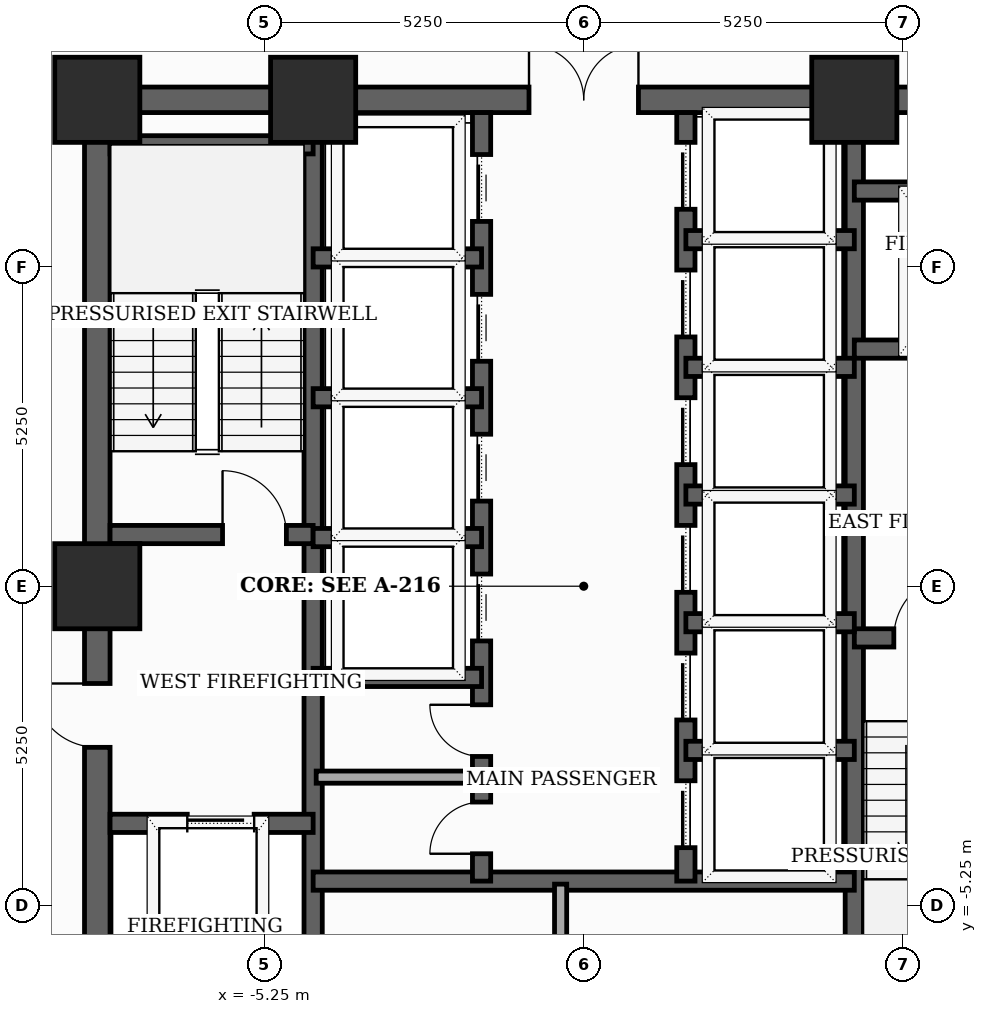
"""IFC4 building model, lengths in metres.
Left out: names, types, materials, properties, quantities, classifications, styles, units other than length and angle.
Written with IfcOpenShell. Run it as: python <this file> out.ifc"""

import sys

from ifc_helpers import new_model, si_unit, direction, frame, frame_2d, origin, origin_2d, place, context, subcontext, project, spatial, rectangle, extrude, element, fill, save


model = new_model("IFC4")
c1 = context("Model", 3, precision=1e-05, world=origin(), true_north=direction((0.0, 1.0)))
c2 = subcontext(c1, "Body", "Model", "MODEL_VIEW")
j1 = project(units=[si_unit("LENGTHUNIT", "METRE"), si_unit("PLANEANGLEUNIT", "RADIAN")], contexts=[c1])
p1 = place(None, origin())
s1 = spatial("IfcSite", under=j1, at=p1, CompositionType="ELEMENT")
p2 = place(p1, origin())
s2 = spatial("IfcBuilding", under=s1, at=p2, CompositionType="ELEMENT")
p3 = place(p2, frame((0.0, 0.0, 101.4)))
s3 = spatial("IfcBuildingStorey", under=s2, at=p3, CompositionType="ELEMENT", Elevation=101.4)
for number, where, z_axis, x_axis in (
    (1, (4.45, 8.0, 0.0), (0.0, 0.0, 1.0), (1.0, 0.0, 0.0)),
    (2, (-4.45, 8.0, 0.0), (0.0, 0.0, 1.0), (1.0, 0.0, 0.0)),
    (3, (-8.0, 8.0, 0.0), (0.0, 0.0, 1.0), (1.0, 0.0, 0.0)),
    (4, (-8.0, 0.0, 0.0), (0.0, 0.0, 1.0), (1.0, 0.0, 0.0)),
):
    element("IfcColumn", number, at=place(p3, frame(where, z_axis=z_axis, x_axis=x_axis)), inside=s3, PredefinedType="COLUMN", context=c2, shape_type="SweptSolid", body=[
        extrude(rectangle(XDim=1.4, YDim=1.4, at=origin_2d()), origin(), (0.0, 0.0, 1.0), 3.7),
    ])
p4 = place(p3, frame((-8.0, -8.0, 0.0), z_axis=(0.0, 0.0, 1.0), x_axis=(0.0, 1.0, 0.0)))
e5 = element("IfcWall", 5, at=p4, inside=s3, PredefinedType="SHEAR", context=c2, shape_type="SweptSolid", body=[
    extrude(rectangle(XDim=16.0, YDim=0.42, at=frame_2d((8.0, 0.0))), origin(), (0.0, 0.0, 1.0), 3.5),
])
p5 = place(p4, frame((0.922, 0.0, 0.0)))
e6 = element("IfcOpeningElement", 6, at=p5, cuts=e5, PredefinedType="OPENING", context=c2, shape_type="SweptSolid", body=[
    extrude(rectangle(XDim=0.85, YDim=2.02, at=frame_2d((0.425, 1.01))), frame((0.0, 0.22, 0.0), z_axis=(0.0, -1.0, 0.0), x_axis=(1.0, 0.0, 0.0)), (0.0, 0.0, 1.0), 0.44),
])
p6 = place(p4, frame((5.35, 0.0, 0.0)))
e7 = element("IfcOpeningElement", 7, at=p6, cuts=e5, PredefinedType="OPENING", context=c2, shape_type="SweptSolid", body=[
    extrude(rectangle(XDim=1.05, YDim=2.15, at=frame_2d((0.525, 1.075))), frame((0.0, 0.22, 0.0), z_axis=(0.0, -1.0, 0.0), x_axis=(1.0, 0.0, 0.0)), (0.0, 0.0, 1.0), 0.44),
])
p7 = place(p3, frame((-8.0, 8.0, 0.0), z_axis=(0.0, 0.0, 1.0), x_axis=(1.0, 0.0, 0.0)))
e8 = element("IfcWall", 8, at=p7, inside=s3, PredefinedType="SHEAR", context=c2, shape_type="SweptSolid", body=[
    extrude(rectangle(XDim=16.0, YDim=0.42, at=frame_2d((8.0, 0.0))), origin(), (0.0, 0.0, 1.0), 3.5),
])
p8 = place(p7, frame((7.1, 0.0, 0.0)))
e9 = element("IfcOpeningElement", 9, at=p8, cuts=e8, PredefinedType="OPENING", context=c2, shape_type="SweptSolid", body=[
    extrude(rectangle(XDim=1.8, YDim=2.15, at=frame_2d((0.9, 1.075))), frame((0.0, 0.22, 0.0), z_axis=(0.0, -1.0, 0.0), x_axis=(1.0, 0.0, 0.0)), (0.0, 0.0, 1.0), 0.44),
])
for number, where, z_axis, x_axis in (
    (10, (-4.45, -7.79, 0.0), (0.0, 0.0, 1.0), (0.0, 1.0, 0.0)),
    (11, (4.45, -7.79, 0.0), (0.0, 0.0, 1.0), (0.0, 1.0, 0.0)),
):
    element("IfcWall", number, at=place(p3, frame(where, z_axis=z_axis, x_axis=x_axis)), inside=s3, PredefinedType="SHEAR", context=c2, shape_type="SweptSolid", body=[
        extrude(rectangle(XDim=15.58, YDim=0.3, at=frame_2d((7.79, 0.0))), origin(), (0.0, 0.0, 1.0), 3.5),
    ])
p9 = place(p3, frame((-7.79, 0.85, 0.0), z_axis=(0.0, 0.0, 1.0), x_axis=(1.0, 0.0, 0.0)))
e12 = element("IfcWall", 12, at=p9, inside=s3, PredefinedType="SHEAR", context=c2, shape_type="SweptSolid", body=[
    extrude(rectangle(XDim=3.34, YDim=0.3, at=frame_2d((1.67, 0.0))), origin(), (0.0, 0.0, 1.0), 3.5),
])
p10 = place(p9, frame((1.85, 0.0, 0.0)))
e13 = element("IfcOpeningElement", 13, at=p10, cuts=e12, PredefinedType="OPENING", context=c2, shape_type="SweptSolid", body=[
    extrude(rectangle(XDim=1.05, YDim=2.15, at=frame_2d((0.525, 1.075))), frame((0.0, 0.16, 0.0), z_axis=(0.0, -1.0, 0.0), x_axis=(1.0, 0.0, 0.0)), (0.0, 0.0, 1.0), 0.32),
])
p11 = place(p3, frame((-7.79, 7.26, 0.0), z_axis=(0.0, 0.0, 1.0), x_axis=(1.0, 0.0, 0.0)))
e14 = element("IfcWall", 14, at=p11, inside=s3, PredefinedType="SHEAR", context=c2, shape_type="SweptSolid", body=[
    extrude(rectangle(XDim=3.34, YDim=0.3, at=frame_2d((1.67, 0.0))), origin(), (0.0, 0.0, 1.0), 3.5),
])
p12 = place(p3, frame((4.45, -0.85, 0.0), z_axis=(0.0, 0.0, 1.0), x_axis=(1.0, 0.0, 0.0)))
e15 = element("IfcWall", 15, at=p12, inside=s3, PredefinedType="SHEAR", context=c2, shape_type="SweptSolid", body=[
    extrude(rectangle(XDim=3.34, YDim=0.3, at=frame_2d((1.67, 0.0))), origin(), (0.0, 0.0, 1.0), 3.5),
])
p13 = place(p12, frame((0.65, 0.0, 0.0)))
e16 = element("IfcOpeningElement", 16, at=p13, cuts=e15, PredefinedType="OPENING", context=c2, shape_type="SweptSolid", body=[
    extrude(rectangle(XDim=1.05, YDim=2.15, at=frame_2d((0.525, 1.075))), frame((0.0, 0.16, 0.0), z_axis=(0.0, -1.0, 0.0), x_axis=(1.0, 0.0, 0.0)), (0.0, 0.0, 1.0), 0.32),
])
p14 = place(p3, frame((-7.79, -3.9, 0.0), z_axis=(0.0, 0.0, 1.0), x_axis=(1.0, 0.0, 0.0)))
e17 = element("IfcWall", 17, at=p14, inside=s3, PredefinedType="SHEAR", context=c2, shape_type="SweptSolid", body=[
    extrude(rectangle(XDim=3.34, YDim=0.3, at=frame_2d((1.67, 0.0))), origin(), (0.0, 0.0, 1.0), 3.5),
])
p15 = place(p14, frame((1.27, 0.0, 0.0)))
e18 = element("IfcOpeningElement", 18, at=p15, cuts=e17, PredefinedType="OPENING", context=c2, shape_type="SweptSolid", body=[
    extrude(rectangle(XDim=1.1, YDim=2.1, at=frame_2d((0.55, 1.05))), frame((0.0, 0.16, 0.0), z_axis=(0.0, -1.0, 0.0), x_axis=(1.0, 0.0, 0.0)), (0.0, 0.0, 1.0), 0.32),
])
p16 = place(p3, frame((4.45, 3.9, 0.0), z_axis=(0.0, 0.0, 1.0), x_axis=(1.0, 0.0, 0.0)))
e19 = element("IfcWall", 19, at=p16, inside=s3, PredefinedType="SHEAR", context=c2, shape_type="SweptSolid", body=[
    extrude(rectangle(XDim=3.34, YDim=0.3, at=frame_2d((1.67, 0.0))), origin(), (0.0, 0.0, 1.0), 3.5),
])
p17 = place(p16, frame((1.18, 0.0, 0.0)))
e20 = element("IfcOpeningElement", 20, at=p17, cuts=e19, PredefinedType="OPENING", context=c2, shape_type="SweptSolid", body=[
    extrude(rectangle(XDim=1.1, YDim=2.1, at=frame_2d((0.55, 1.05))), frame((0.0, 0.16, 0.0), z_axis=(0.0, -1.0, 0.0), x_axis=(1.0, 0.0, 0.0)), (0.0, 0.0, 1.0), 0.32),
])
p18 = place(p3, frame((4.45, 6.5, 0.0), z_axis=(0.0, 0.0, 1.0), x_axis=(1.0, 0.0, 0.0)))
e21 = element("IfcWall", 21, at=p18, inside=s3, PredefinedType="SHEAR", context=c2, shape_type="SweptSolid", body=[
    extrude(rectangle(XDim=3.34, YDim=0.3, at=frame_2d((1.67, 0.0))), origin(), (0.0, 0.0, 1.0), 3.5),
])
p19 = place(p3, frame((-4.45, -4.85, 0.0), z_axis=(0.0, 0.0, 1.0), x_axis=(1.0, 0.0, 0.0)))
e22 = element("IfcWall", 22, at=p19, inside=s3, PredefinedType="SHEAR", context=c2, shape_type="SweptSolid", body=[
    extrude(rectangle(XDim=8.9, YDim=0.3, at=frame_2d((4.45, 0.0))), origin(), (0.0, 0.0, 1.0), 3.5),
])
p20 = place(p3, frame((-1.68, -4.85, 0.0), z_axis=(0.0, 0.0, 1.0), x_axis=(0.0, 1.0, 0.0)))
e23 = element("IfcWall", 23, at=p20, inside=s3, PredefinedType="SHEAR", context=c2, shape_type="SweptSolid", body=[
    extrude(rectangle(XDim=12.64, YDim=0.3, at=frame_2d((6.32, 0.0))), origin(), (0.0, 0.0, 1.0), 3.5),
])
p21 = place(p20, frame((3.95, 0.0, 0.0)))
e24 = element("IfcOpeningElement", 24, at=p21, cuts=e23, PredefinedType="OPENING", context=c2, shape_type="SweptSolid", body=[
    extrude(rectangle(XDim=1.1, YDim=2.1, at=frame_2d((0.55, 1.05))), frame((0.0, 0.16, 0.0), z_axis=(0.0, -1.0, 0.0), x_axis=(1.0, 0.0, 0.0)), (0.0, 0.0, 1.0), 0.32),
])
p22 = place(p20, frame((6.25, 0.0, 0.0)))
e25 = element("IfcOpeningElement", 25, at=p22, cuts=e23, PredefinedType="OPENING", context=c2, shape_type="SweptSolid", body=[
    extrude(rectangle(XDim=1.1, YDim=2.1, at=frame_2d((0.55, 1.05))), frame((0.0, 0.16, 0.0), z_axis=(0.0, -1.0, 0.0), x_axis=(1.0, 0.0, 0.0)), (0.0, 0.0, 1.0), 0.32),
])
p23 = place(p20, frame((8.55, 0.0, 0.0)))
e26 = element("IfcOpeningElement", 26, at=p23, cuts=e23, PredefinedType="OPENING", context=c2, shape_type="SweptSolid", body=[
    extrude(rectangle(XDim=1.1, YDim=2.1, at=frame_2d((0.55, 1.05))), frame((0.0, 0.16, 0.0), z_axis=(0.0, -1.0, 0.0), x_axis=(1.0, 0.0, 0.0)), (0.0, 0.0, 1.0), 0.32),
])
p24 = place(p20, frame((10.85, 0.0, 0.0)))
e27 = element("IfcOpeningElement", 27, at=p24, cuts=e23, PredefinedType="OPENING", context=c2, shape_type="SweptSolid", body=[
    extrude(rectangle(XDim=1.1, YDim=2.1, at=frame_2d((0.55, 1.05))), frame((0.0, 0.16, 0.0), z_axis=(0.0, -1.0, 0.0), x_axis=(1.0, 0.0, 0.0)), (0.0, 0.0, 1.0), 0.32),
])
p25 = place(p20, frame((0.45, 0.0, 0.0)))
e28 = element("IfcOpeningElement", 28, at=p25, cuts=e23, PredefinedType="OPENING", context=c2, shape_type="SweptSolid", body=[
    extrude(rectangle(XDim=0.85, YDim=2.02, at=frame_2d((0.425, 1.01))), frame((0.0, 0.16, 0.0), z_axis=(0.0, -1.0, 0.0), x_axis=(1.0, 0.0, 0.0)), (0.0, 0.0, 1.0), 0.32),
])
p26 = place(p20, frame((2.05, 0.0, 0.0)))
e29 = element("IfcOpeningElement", 29, at=p26, cuts=e23, PredefinedType="OPENING", context=c2, shape_type="SweptSolid", body=[
    extrude(rectangle(XDim=0.85, YDim=2.02, at=frame_2d((0.425, 1.01))), frame((0.0, 0.16, 0.0), z_axis=(0.0, -1.0, 0.0), x_axis=(1.0, 0.0, 0.0)), (0.0, 0.0, 1.0), 0.32),
])
p27 = place(p3, frame((1.68, -4.85, 0.0), z_axis=(0.0, 0.0, 1.0), x_axis=(0.0, 1.0, 0.0)))
e30 = element("IfcWall", 30, at=p27, inside=s3, PredefinedType="SHEAR", context=c2, shape_type="SweptSolid", body=[
    extrude(rectangle(XDim=12.64, YDim=0.3, at=frame_2d((6.32, 0.0))), origin(), (0.0, 0.0, 1.0), 3.5),
])
p28 = place(p27, frame((0.55, 0.0, 0.0)))
e31 = element("IfcOpeningElement", 31, at=p28, cuts=e30, PredefinedType="OPENING", context=c2, shape_type="SweptSolid", body=[
    extrude(rectangle(XDim=1.1, YDim=2.1, at=frame_2d((0.55, 1.05))), frame((0.0, 0.16, 0.0), z_axis=(0.0, -1.0, 0.0), x_axis=(1.0, 0.0, 0.0)), (0.0, 0.0, 1.0), 0.32),
])
p29 = place(p27, frame((2.65, 0.0, 0.0)))
e32 = element("IfcOpeningElement", 32, at=p29, cuts=e30, PredefinedType="OPENING", context=c2, shape_type="SweptSolid", body=[
    extrude(rectangle(XDim=1.1, YDim=2.1, at=frame_2d((0.55, 1.05))), frame((0.0, 0.16, 0.0), z_axis=(0.0, -1.0, 0.0), x_axis=(1.0, 0.0, 0.0)), (0.0, 0.0, 1.0), 0.32),
])
p30 = place(p27, frame((4.75, 0.0, 0.0)))
e33 = element("IfcOpeningElement", 33, at=p30, cuts=e30, PredefinedType="OPENING", context=c2, shape_type="SweptSolid", body=[
    extrude(rectangle(XDim=1.1, YDim=2.1, at=frame_2d((0.55, 1.05))), frame((0.0, 0.16, 0.0), z_axis=(0.0, -1.0, 0.0), x_axis=(1.0, 0.0, 0.0)), (0.0, 0.0, 1.0), 0.32),
])
p31 = place(p27, frame((6.85, 0.0, 0.0)))
e34 = element("IfcOpeningElement", 34, at=p31, cuts=e30, PredefinedType="OPENING", context=c2, shape_type="SweptSolid", body=[
    extrude(rectangle(XDim=1.1, YDim=2.1, at=frame_2d((0.55, 1.05))), frame((0.0, 0.16, 0.0), z_axis=(0.0, -1.0, 0.0), x_axis=(1.0, 0.0, 0.0)), (0.0, 0.0, 1.0), 0.32),
])
p32 = place(p27, frame((8.95, 0.0, 0.0)))
e35 = element("IfcOpeningElement", 35, at=p32, cuts=e30, PredefinedType="OPENING", context=c2, shape_type="SweptSolid", body=[
    extrude(rectangle(XDim=1.1, YDim=2.1, at=frame_2d((0.55, 1.05))), frame((0.0, 0.16, 0.0), z_axis=(0.0, -1.0, 0.0), x_axis=(1.0, 0.0, 0.0)), (0.0, 0.0, 1.0), 0.32),
])
p33 = place(p27, frame((11.05, 0.0, 0.0)))
e36 = element("IfcOpeningElement", 36, at=p33, cuts=e30, PredefinedType="OPENING", context=c2, shape_type="SweptSolid", body=[
    extrude(rectangle(XDim=1.1, YDim=2.1, at=frame_2d((0.55, 1.05))), frame((0.0, 0.16, 0.0), z_axis=(0.0, -1.0, 0.0), x_axis=(1.0, 0.0, 0.0)), (0.0, 0.0, 1.0), 0.32),
])
for number, where, z_axis, x_axis in (
    (37, (-4.45, -1.5, 0.0), (0.0, 0.0, 1.0), (1.0, 0.0, 0.0)),
    (38, (-4.45, 0.8, 0.0), (0.0, 0.0, 1.0), (1.0, 0.0, 0.0)),
    (39, (-4.45, 3.1, 0.0), (0.0, 0.0, 1.0), (1.0, 0.0, 0.0)),
    (40, (-4.45, 5.4, 0.0), (0.0, 0.0, 1.0), (1.0, 0.0, 0.0)),
    (41, (1.68, 1.5, 0.0), (0.0, 0.0, 1.0), (1.0, 0.0, 0.0)),
    (42, (1.68, 3.6, 0.0), (0.0, 0.0, 1.0), (1.0, 0.0, 0.0)),
    (43, (1.68, 5.7, 0.0), (0.0, 0.0, 1.0), (1.0, 0.0, 0.0)),
    (44, (1.68, -2.7, 0.0), (0.0, 0.0, 1.0), (1.0, 0.0, 0.0)),
    (45, (1.68, -0.6, 0.0), (0.0, 0.0, 1.0), (1.0, 0.0, 0.0)),
):
    element("IfcWall", number, at=place(p3, frame(where, z_axis=z_axis, x_axis=x_axis)), inside=s3, PredefinedType="SHEAR", context=c2, shape_type="SweptSolid", body=[
        extrude(rectangle(XDim=2.77, YDim=0.3, at=frame_2d((1.385, 0.0))), origin(), (0.0, 0.0, 1.0), 3.5),
    ])
p34 = place(p3, frame((-0.38, -7.85, 0.0), z_axis=(0.0, 0.0, 1.0), x_axis=(0.0, 1.0, 0.0)))
e46 = element("IfcWall", 46, at=p34, inside=s3, PredefinedType="SOLIDWALL", context=c2, shape_type="SweptSolid", body=[
    extrude(rectangle(XDim=2.95, YDim=0.2, at=frame_2d((1.475, 0.0))), origin(), (0.0, 0.0, 1.0), 2.885),
])
p35 = place(p3, frame((-4.4, -3.14, 0.0), z_axis=(0.0, 0.0, 1.0), x_axis=(1.0, 0.0, 0.0)))
e47 = element("IfcWall", 47, at=p35, inside=s3, PredefinedType="SOLIDWALL", context=c2, shape_type="SweptSolid", body=[
    extrude(rectangle(XDim=2.68, YDim=0.2, at=frame_2d((1.34, 0.0))), origin(), (0.0, 0.0, 1.0), 3.5),
])
p36 = place(p6, origin())
e48 = element("IfcDoor", 48, at=p36, inside=s3, OperationType="SINGLE_SWING_RIGHT", PredefinedType="DOOR", context=c2, shape_type="SweptSolid", body=[
    extrude(rectangle(XDim=1.05, YDim=2.15, at=frame_2d((0.525, 1.075))), frame((0.0, 0.025, 0.0), z_axis=(0.0, -1.0, 0.0), x_axis=(1.0, 0.0, 0.0)), (0.0, 0.0, 1.0), 0.05),
])
fill(e7, e48)
p37 = place(p8, origin())
e49 = element("IfcDoor", 49, at=p37, inside=s3, OperationType="DOUBLE_DOOR_SINGLE_SWING", PredefinedType="DOOR", context=c2, shape_type="SweptSolid", body=[
    extrude(rectangle(XDim=1.8, YDim=2.15, at=frame_2d((0.9, 1.075))), frame((0.0, 0.025, 0.0), z_axis=(0.0, -1.0, 0.0), x_axis=(1.0, 0.0, 0.0)), (0.0, 0.0, 1.0), 0.05),
])
fill(e9, e49)
p38 = place(p10, origin())
e50 = element("IfcDoor", 50, at=p38, inside=s3, OperationType="SINGLE_SWING_LEFT", PredefinedType="DOOR", context=c2, shape_type="SweptSolid", body=[
    extrude(rectangle(XDim=1.05, YDim=2.15, at=frame_2d((0.525, 1.075))), frame((0.0, 0.025, 0.0), z_axis=(0.0, -1.0, 0.0), x_axis=(1.0, 0.0, 0.0)), (0.0, 0.0, 1.0), 0.05),
])
fill(e13, e50)
p39 = place(p13, origin())
e51 = element("IfcDoor", 51, at=p39, inside=s3, OperationType="SINGLE_SWING_RIGHT", PredefinedType="DOOR", context=c2, shape_type="SweptSolid", body=[
    extrude(rectangle(XDim=1.05, YDim=2.15, at=frame_2d((0.525, 1.075))), frame((0.0, 0.025, 0.0), z_axis=(0.0, -1.0, 0.0), x_axis=(1.0, 0.0, 0.0)), (0.0, 0.0, 1.0), 0.05),
])
fill(e16, e51)
p40 = place(p15, origin())
e52 = element("IfcDoor", 52, at=p40, inside=s3, OperationType="SLIDING_TO_LEFT", PredefinedType="DOOR", context=c2, shape_type="SweptSolid", body=[
    extrude(rectangle(XDim=1.1, YDim=2.1, at=frame_2d((0.55, 1.05))), frame((0.0, 0.025, 0.0), z_axis=(0.0, -1.0, 0.0), x_axis=(1.0, 0.0, 0.0)), (0.0, 0.0, 1.0), 0.05),
])
fill(e18, e52)
p41 = place(p21, origin())
e53 = element("IfcDoor", 53, at=p41, inside=s3, OperationType="SLIDING_TO_LEFT", PredefinedType="DOOR", context=c2, shape_type="SweptSolid", body=[
    extrude(rectangle(XDim=1.1, YDim=2.1, at=frame_2d((0.55, 1.05))), frame((0.0, 0.025, 0.0), z_axis=(0.0, -1.0, 0.0), x_axis=(1.0, 0.0, 0.0)), (0.0, 0.0, 1.0), 0.05),
])
fill(e24, e53)
p42 = place(p22, origin())
e54 = element("IfcDoor", 54, at=p42, inside=s3, OperationType="SLIDING_TO_LEFT", PredefinedType="DOOR", context=c2, shape_type="SweptSolid", body=[
    extrude(rectangle(XDim=1.1, YDim=2.1, at=frame_2d((0.55, 1.05))), frame((0.0, 0.025, 0.0), z_axis=(0.0, -1.0, 0.0), x_axis=(1.0, 0.0, 0.0)), (0.0, 0.0, 1.0), 0.05),
])
fill(e25, e54)
p43 = place(p23, origin())
e55 = element("IfcDoor", 55, at=p43, inside=s3, OperationType="SLIDING_TO_LEFT", PredefinedType="DOOR", context=c2, shape_type="SweptSolid", body=[
    extrude(rectangle(XDim=1.1, YDim=2.1, at=frame_2d((0.55, 1.05))), frame((0.0, 0.025, 0.0), z_axis=(0.0, -1.0, 0.0), x_axis=(1.0, 0.0, 0.0)), (0.0, 0.0, 1.0), 0.05),
])
fill(e26, e55)
p44 = place(p24, origin())
e56 = element("IfcDoor", 56, at=p44, inside=s3, OperationType="SLIDING_TO_LEFT", PredefinedType="DOOR", context=c2, shape_type="SweptSolid", body=[
    extrude(rectangle(XDim=1.1, YDim=2.1, at=frame_2d((0.55, 1.05))), frame((0.0, 0.025, 0.0), z_axis=(0.0, -1.0, 0.0), x_axis=(1.0, 0.0, 0.0)), (0.0, 0.0, 1.0), 0.05),
])
fill(e27, e56)
p45 = place(p25, origin())
e57 = element("IfcDoor", 57, at=p45, inside=s3, OperationType="SINGLE_SWING_LEFT", PredefinedType="TRAPDOOR", context=c2, shape_type="SweptSolid", body=[
    extrude(rectangle(XDim=0.85, YDim=2.02, at=frame_2d((0.425, 1.01))), frame((0.0, 0.025, 0.0), z_axis=(0.0, -1.0, 0.0), x_axis=(1.0, 0.0, 0.0)), (0.0, 0.0, 1.0), 0.05),
])
fill(e28, e57)
p46 = place(p26, origin())
e58 = element("IfcDoor", 58, at=p46, inside=s3, OperationType="SINGLE_SWING_RIGHT", PredefinedType="TRAPDOOR", context=c2, shape_type="SweptSolid", body=[
    extrude(rectangle(XDim=0.85, YDim=2.02, at=frame_2d((0.425, 1.01))), frame((0.0, 0.025, 0.0), z_axis=(0.0, -1.0, 0.0), x_axis=(1.0, 0.0, 0.0)), (0.0, 0.0, 1.0), 0.05),
])
fill(e29, e58)
p47 = place(p28, origin())
e59 = element("IfcDoor", 59, at=p47, inside=s3, OperationType="SLIDING_TO_LEFT", PredefinedType="DOOR", context=c2, shape_type="SweptSolid", body=[
    extrude(rectangle(XDim=1.1, YDim=2.1, at=frame_2d((0.55, 1.05))), frame((0.0, 0.025, 0.0), z_axis=(0.0, -1.0, 0.0), x_axis=(1.0, 0.0, 0.0)), (0.0, 0.0, 1.0), 0.05),
])
fill(e31, e59)
p48 = place(p29, origin())
e60 = element("IfcDoor", 60, at=p48, inside=s3, OperationType="SLIDING_TO_LEFT", PredefinedType="DOOR", context=c2, shape_type="SweptSolid", body=[
    extrude(rectangle(XDim=1.1, YDim=2.1, at=frame_2d((0.55, 1.05))), frame((0.0, 0.025, 0.0), z_axis=(0.0, -1.0, 0.0), x_axis=(1.0, 0.0, 0.0)), (0.0, 0.0, 1.0), 0.05),
])
fill(e32, e60)
p49 = place(p30, origin())
e61 = element("IfcDoor", 61, at=p49, inside=s3, OperationType="SLIDING_TO_LEFT", PredefinedType="DOOR", context=c2, shape_type="SweptSolid", body=[
    extrude(rectangle(XDim=1.1, YDim=2.1, at=frame_2d((0.55, 1.05))), frame((0.0, 0.025, 0.0), z_axis=(0.0, -1.0, 0.0), x_axis=(1.0, 0.0, 0.0)), (0.0, 0.0, 1.0), 0.05),
])
fill(e33, e61)
p50 = place(p31, origin())
e62 = element("IfcDoor", 62, at=p50, inside=s3, OperationType="SLIDING_TO_LEFT", PredefinedType="DOOR", context=c2, shape_type="SweptSolid", body=[
    extrude(rectangle(XDim=1.1, YDim=2.1, at=frame_2d((0.55, 1.05))), frame((0.0, 0.025, 0.0), z_axis=(0.0, -1.0, 0.0), x_axis=(1.0, 0.0, 0.0)), (0.0, 0.0, 1.0), 0.05),
])
fill(e34, e62)
p51 = place(p32, origin())
e63 = element("IfcDoor", 63, at=p51, inside=s3, OperationType="SLIDING_TO_LEFT", PredefinedType="DOOR", context=c2, shape_type="SweptSolid", body=[
    extrude(rectangle(XDim=1.1, YDim=2.1, at=frame_2d((0.55, 1.05))), frame((0.0, 0.025, 0.0), z_axis=(0.0, -1.0, 0.0), x_axis=(1.0, 0.0, 0.0)), (0.0, 0.0, 1.0), 0.05),
])
fill(e35, e63)
p52 = place(p33, origin())
e64 = element("IfcDoor", 64, at=p52, inside=s3, OperationType="SLIDING_TO_LEFT", PredefinedType="DOOR", context=c2, shape_type="SweptSolid", body=[
    extrude(rectangle(XDim=1.1, YDim=2.1, at=frame_2d((0.55, 1.05))), frame((0.0, 0.025, 0.0), z_axis=(0.0, -1.0, 0.0), x_axis=(1.0, 0.0, 0.0)), (0.0, 0.0, 1.0), 0.05),
])
fill(e36, e64)
save(model, sys.argv[1])
